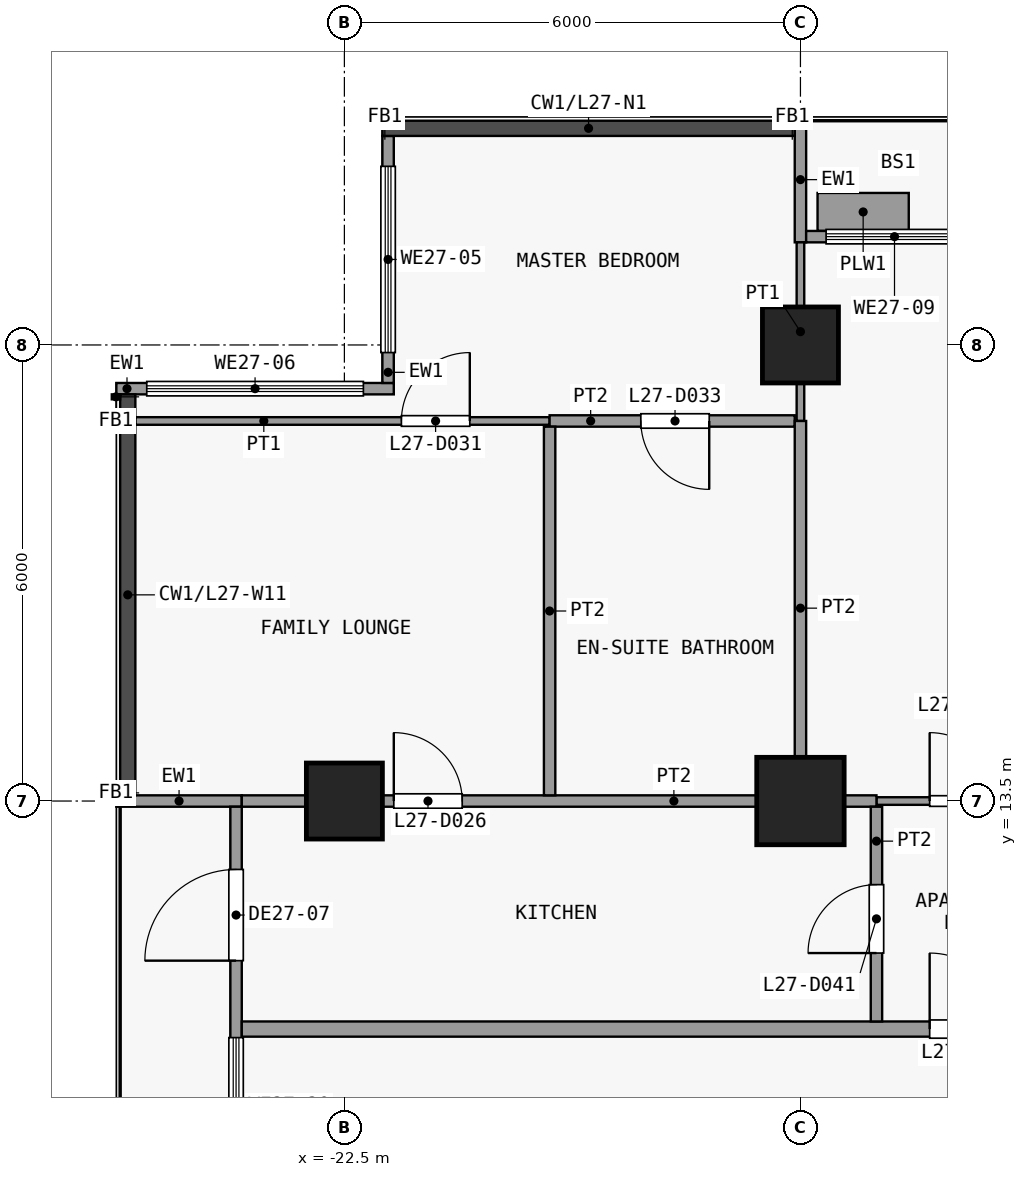
"""IFC4 building model, lengths in metres.
Left out: names, types, materials, properties, quantities, classifications, styles, units other than length and angle.
Written with IfcOpenShell. Run it as: python <this file> out.ifc"""

import sys

from ifc_helpers import new_model, si_unit, direction, frame, frame_2d, origin, origin_2d, place, context, subcontext, project, spatial, rectangle, extrude, element, fill, save


model = new_model("IFC4")
c1 = context("Model", 3, precision=1e-05, world=origin(), true_north=direction((0.0, 1.0)))
c2 = subcontext(c1, "Body", "Model", "MODEL_VIEW")
j1 = project(units=[si_unit("LENGTHUNIT", "METRE"), si_unit("PLANEANGLEUNIT", "RADIAN")], contexts=[c1])
p1 = place(None, origin())
s1 = spatial("IfcSite", under=j1, at=p1, CompositionType="ELEMENT")
p2 = place(p1, origin())
s2 = spatial("IfcBuilding", under=s1, at=p2, CompositionType="ELEMENT")
p3 = place(p2, frame((0.0, 0.0, 109.9)))
s3 = spatial("IfcBuildingStorey", under=s2, at=p3, CompositionType="ELEMENT", Elevation=109.9)
p4 = place(p3, frame((-22.5, 13.5, 0.0), z_axis=(0.0, 0.0, 1.0), x_axis=(1.0, 0.0, 0.0)))
e1 = element("IfcColumn", 1, at=p4, inside=s3, PredefinedType="COLUMN", context=c2, shape_type="SweptSolid", body=[
    extrude(rectangle(XDim=1.0, YDim=1.0, at=origin_2d()), origin(), (0.0, 0.0, 1.0), 3.6),
])
p5 = place(p3, frame((-16.5, 13.5, 0.0), z_axis=(0.0, 0.0, 1.0), x_axis=(1.0, 0.0, 0.0)))
e2 = element("IfcColumn", 2, at=p5, inside=s3, PredefinedType="COLUMN", context=c2, shape_type="SweptSolid", body=[
    extrude(rectangle(XDim=1.15, YDim=1.15, at=origin_2d()), origin(), (0.0, 0.0, 1.0), 3.6),
])
p6 = place(p3, frame((-16.5, 19.5, 0.0), z_axis=(0.0, 0.0, 1.0), x_axis=(1.0, 0.0, 0.0)))
e3 = element("IfcColumn", 3, at=p6, inside=s3, PredefinedType="COLUMN", context=c2, shape_type="SweptSolid", body=[
    extrude(rectangle(XDim=1.0, YDim=1.0, at=origin_2d()), origin(), (0.0, 0.0, 1.0), 3.6),
])
p7 = place(p3, frame((-21.925, 19.0, 0.0), z_axis=(0.0, 0.0, 1.0), x_axis=(0.0, 1.0, 0.0)))
e4 = element("IfcWall", 4, at=p7, inside=s3, PredefinedType="SOLIDWALL", context=c2, shape_type="SweptSolid", body=[
    extrude(rectangle(XDim=3.25, YDim=0.15, at=frame_2d((1.625, 0.0))), origin(), (0.0, 0.0, 1.0), 3.3),
])
p8 = place(p7, frame((0.4, 0.0, 0.9)))
e5 = element("IfcOpeningElement", 5, at=p8, cuts=e4, PredefinedType="OPENING", context=c2, shape_type="SweptSolid", body=[
    extrude(rectangle(XDim=2.45, YDim=2.4, at=frame_2d((1.225, 1.2))), frame((0.0, 0.085, 0.0), z_axis=(0.0, -1.0, 0.0), x_axis=(1.0, 0.0, 0.0)), (0.0, 0.0, 1.0), 0.17),
])
p9 = place(p3, frame((-25.5, 18.925, 0.0), z_axis=(0.0, 0.0, 1.0), x_axis=(1.0, 0.0, 0.0)))
e6 = element("IfcWall", 6, at=p9, inside=s3, PredefinedType="SOLIDWALL", context=c2, shape_type="SweptSolid", body=[
    extrude(rectangle(XDim=3.65, YDim=0.15, at=frame_2d((1.825, 0.0))), origin(), (0.0, 0.0, 1.0), 3.3),
])
p10 = place(p9, frame((0.4, 0.0, 0.9)))
e7 = element("IfcOpeningElement", 7, at=p10, cuts=e6, PredefinedType="OPENING", context=c2, shape_type="SweptSolid", body=[
    extrude(rectangle(XDim=2.85, YDim=2.4, at=frame_2d((1.425, 1.2))), frame((0.0, 0.085, 0.0), z_axis=(0.0, -1.0, 0.0), x_axis=(1.0, 0.0, 0.0)), (0.0, 0.0, 1.0), 0.17),
])
p11 = place(p3, frame((-16.5, 20.85, 0.0), z_axis=(0.0, 0.0, 1.0), x_axis=(0.0, 1.0, 0.0)))
e8 = element("IfcWall", 8, at=p11, inside=s3, PredefinedType="SOLIDWALL", context=c2, shape_type="SweptSolid", body=[
    extrude(rectangle(XDim=1.65, YDim=0.15, at=frame_2d((0.825, 0.0))), origin(), (0.0, 0.0, 1.0), 3.3),
])
p12 = place(p3, frame((-16.425, 20.925, 0.0), z_axis=(0.0, 0.0, 1.0), x_axis=(1.0, 0.0, 0.0)))
e9 = element("IfcWall", 9, at=p12, inside=s3, PredefinedType="SOLIDWALL", context=c2, shape_type="SweptSolid", body=[
    extrude(rectangle(XDim=5.925, YDim=0.15, at=frame_2d((2.962, 0.0))), origin(), (0.0, 0.0, 1.0), 3.3),
])
p13 = place(p12, frame((2.325, 0.0, 0.0)))
e10 = element("IfcOpeningElement", 10, at=p13, cuts=e9, PredefinedType="OPENING", context=c2, shape_type="SweptSolid", body=[
    extrude(rectangle(XDim=1.2, YDim=2.4, at=frame_2d((0.6, 1.2))), frame((0.0, 0.085, 0.0), z_axis=(0.0, -1.0, 0.0), x_axis=(1.0, 0.0, 0.0)), (0.0, 0.0, 1.0), 0.17),
])
p14 = place(p12, frame((0.262, 0.0, 0.9)))
e11 = element("IfcOpeningElement", 11, at=p14, cuts=e9, PredefinedType="OPENING", context=c2, shape_type="SweptSolid", body=[
    extrude(rectangle(XDim=1.8, YDim=2.1, at=frame_2d((0.9, 1.05))), frame((0.0, 0.085, 0.0), z_axis=(0.0, -1.0, 0.0), x_axis=(1.0, 0.0, 0.0)), (0.0, 0.0, 1.0), 0.17),
])
p15 = place(p12, frame((3.825, 0.0, 0.9)))
e12 = element("IfcOpeningElement", 12, at=p15, cuts=e9, PredefinedType="OPENING", context=c2, shape_type="SweptSolid", body=[
    extrude(rectangle(XDim=1.8, YDim=2.1, at=frame_2d((0.9, 1.05))), frame((0.0, 0.085, 0.0), z_axis=(0.0, -1.0, 0.0), x_axis=(1.0, 0.0, 0.0)), (0.0, 0.0, 1.0), 0.17),
])
p16 = place(p3, frame((-16.275, 21.25, 0.0), z_axis=(0.0, 0.0, 1.0), x_axis=(1.0, 0.0, 0.0)))
e13 = element("IfcWall", 13, at=p16, inside=s3, PredefinedType="USERDEFINED", context=c2, shape_type="SweptSolid", body=[
    extrude(rectangle(XDim=1.2, YDim=0.5, at=frame_2d((0.6, 0.0))), origin(), (0.0, 0.0, 1.0), 0.9),
])
p17 = place(p3, frame((-23.85, 13.5, 0.0), z_axis=(0.0, 0.0, 1.0), x_axis=(-1.0, 0.0, 0.0)))
e14 = element("IfcWall", 14, at=p17, inside=s3, PredefinedType="SOLIDWALL", context=c2, shape_type="SweptSolid", body=[
    extrude(rectangle(XDim=1.65, YDim=0.15, at=frame_2d((0.825, 0.0))), origin(), (0.0, 0.0, 1.0), 3.3),
])
p18 = place(p3, frame((-23.925, 7.575, 0.0), z_axis=(0.0, 0.0, 1.0), x_axis=(0.0, 1.0, 0.0)))
e15 = element("IfcWall", 15, at=p18, inside=s3, PredefinedType="SOLIDWALL", context=c2, shape_type="SweptSolid", body=[
    extrude(rectangle(XDim=5.85, YDim=0.15, at=frame_2d((2.925, 0.0))), origin(), (0.0, 0.0, 1.0), 3.3),
])
p19 = place(p18, frame((3.825, 0.0, 0.0)))
e16 = element("IfcOpeningElement", 16, at=p19, cuts=e15, PredefinedType="OPENING", context=c2, shape_type="SweptSolid", body=[
    extrude(rectangle(XDim=1.2, YDim=2.4, at=frame_2d((0.6, 1.2))), frame((0.0, 0.085, 0.0), z_axis=(0.0, -1.0, 0.0), x_axis=(1.0, 0.0, 0.0)), (0.0, 0.0, 1.0), 0.17),
])
p20 = place(p18, frame((1.012, 0.0, 0.9)))
e17 = element("IfcOpeningElement", 17, at=p20, cuts=e15, PredefinedType="OPENING", context=c2, shape_type="SweptSolid", body=[
    extrude(rectangle(XDim=1.8, YDim=2.1, at=frame_2d((0.9, 1.05))), frame((0.0, 0.085, 0.0), z_axis=(0.0, -1.0, 0.0), x_axis=(1.0, 0.0, 0.0)), (0.0, 0.0, 1.0), 0.17),
])
p21 = place(p3, frame((-23.85, 10.5, 0.0), z_axis=(0.0, 0.0, 1.0), x_axis=(1.0, 0.0, 0.0)))
e18 = element("IfcWall", 18, at=p21, inside=s3, PredefinedType="PARTITIONING", context=c2, shape_type="SweptSolid", body=[
    extrude(rectangle(XDim=47.7, YDim=0.2, at=frame_2d((23.85, 0.0))), origin(), (0.0, 0.0, 1.0), 3.3),
])
p22 = place(p21, frame((9.05, 0.0, 0.0)))
e19 = element("IfcOpeningElement", 19, at=p22, cuts=e18, PredefinedType="OPENING", context=c2, shape_type="SweptSolid", body=[
    extrude(rectangle(XDim=1.0, YDim=2.1, at=frame_2d((0.5, 1.05))), frame((0.0, 0.11, 0.0), z_axis=(0.0, -1.0, 0.0), x_axis=(1.0, 0.0, 0.0)), (0.0, 0.0, 1.0), 0.22),
])
p23 = place(p21, frame((14.05, 0.0, 0.0)))
e20 = element("IfcOpeningElement", 20, at=p23, cuts=e18, PredefinedType="OPENING", context=c2, shape_type="SweptSolid", body=[
    extrude(rectangle(XDim=1.0, YDim=2.1, at=frame_2d((0.5, 1.05))), frame((0.0, 0.11, 0.0), z_axis=(0.0, -1.0, 0.0), x_axis=(1.0, 0.0, 0.0)), (0.0, 0.0, 1.0), 0.22),
])
p24 = place(p21, frame((29.05, 0.0, 0.0)))
e21 = element("IfcOpeningElement", 21, at=p24, cuts=e18, PredefinedType="OPENING", context=c2, shape_type="SweptSolid", body=[
    extrude(rectangle(XDim=1.0, YDim=2.1, at=frame_2d((0.5, 1.05))), frame((0.0, 0.11, 0.0), z_axis=(0.0, -1.0, 0.0), x_axis=(1.0, 0.0, 0.0)), (0.0, 0.0, 1.0), 0.22),
])
p25 = place(p21, frame((41.05, 0.0, 0.0)))
e22 = element("IfcOpeningElement", 22, at=p25, cuts=e18, PredefinedType="OPENING", context=c2, shape_type="SweptSolid", body=[
    extrude(rectangle(XDim=1.0, YDim=2.1, at=frame_2d((0.5, 1.05))), frame((0.0, 0.11, 0.0), z_axis=(0.0, -1.0, 0.0), x_axis=(1.0, 0.0, 0.0)), (0.0, 0.0, 1.0), 0.22),
])
p26 = place(p3, frame((-15.5, 13.5, 0.0), z_axis=(0.0, 0.0, 1.0), x_axis=(1.0, 0.0, 0.0)))
e23 = element("IfcWall", 23, at=p26, inside=s3, PredefinedType="PARTITIONING", context=c2, shape_type="SweptSolid", body=[
    extrude(rectangle(XDim=2.4, YDim=0.1, at=frame_2d((1.2, 0.0))), origin(), (0.0, 0.0, 1.0), 3.3),
])
p27 = place(p26, frame((0.7, 0.0, 0.0)))
e24 = element("IfcOpeningElement", 24, at=p27, cuts=e23, PredefinedType="OPENING", context=c2, shape_type="SweptSolid", body=[
    extrude(rectangle(XDim=0.9, YDim=2.1, at=frame_2d((0.45, 1.05))), frame((0.0, 0.06, 0.0), z_axis=(0.0, -1.0, 0.0), x_axis=(1.0, 0.0, 0.0)), (0.0, 0.0, 1.0), 0.12),
])
p28 = place(p3, frame((-23.85, 13.5, 0.0), z_axis=(0.0, 0.0, 1.0), x_axis=(1.0, 0.0, 0.0)))
e25 = element("IfcWall", 25, at=p28, inside=s3, PredefinedType="PARTITIONING", context=c2, shape_type="SweptSolid", body=[
    extrude(rectangle(XDim=8.35, YDim=0.15, at=frame_2d((4.175, 0.0))), origin(), (0.0, 0.0, 1.0), 3.3),
])
p29 = place(p28, frame((2.0, 0.0, 0.0)))
e26 = element("IfcOpeningElement", 26, at=p29, cuts=e25, PredefinedType="OPENING", context=c2, shape_type="SweptSolid", body=[
    extrude(rectangle(XDim=0.9, YDim=2.1, at=frame_2d((0.45, 1.05))), frame((0.0, 0.085, 0.0), z_axis=(0.0, -1.0, 0.0), x_axis=(1.0, 0.0, 0.0)), (0.0, 0.0, 1.0), 0.17),
])
p30 = place(p3, frame((-25.25, 18.5, 0.0), z_axis=(0.0, 0.0, 1.0), x_axis=(1.0, 0.0, 0.0)))
e27 = element("IfcWall", 27, at=p30, inside=s3, PredefinedType="PARTITIONING", context=c2, shape_type="SweptSolid", body=[
    extrude(rectangle(XDim=5.45, YDim=0.1, at=frame_2d((2.725, 0.0))), origin(), (0.0, 0.0, 1.0), 3.3),
])
p31 = place(p30, frame((3.5, 0.0, 0.0)))
e28 = element("IfcOpeningElement", 28, at=p31, cuts=e27, PredefinedType="OPENING", context=c2, shape_type="SweptSolid", body=[
    extrude(rectangle(XDim=0.9, YDim=2.1, at=frame_2d((0.45, 1.05))), frame((0.0, 0.06, 0.0), z_axis=(0.0, -1.0, 0.0), x_axis=(1.0, 0.0, 0.0)), (0.0, 0.0, 1.0), 0.12),
])
p32 = place(p3, frame((-19.8, 18.5, 0.0), z_axis=(0.0, 0.0, 1.0), x_axis=(1.0, 0.0, 0.0)))
e29 = element("IfcWall", 29, at=p32, inside=s3, PredefinedType="PARTITIONING", context=c2, shape_type="SweptSolid", body=[
    extrude(rectangle(XDim=3.225, YDim=0.15, at=frame_2d((1.613, 0.0))), origin(), (0.0, 0.0, 1.0), 3.3),
])
p33 = place(p32, frame((1.2, 0.0, 0.0)))
e30 = element("IfcOpeningElement", 30, at=p33, cuts=e29, PredefinedType="OPENING", context=c2, shape_type="SweptSolid", body=[
    extrude(rectangle(XDim=0.9, YDim=2.1, at=frame_2d((0.45, 1.05))), frame((0.0, 0.085, 0.0), z_axis=(0.0, -1.0, 0.0), x_axis=(1.0, 0.0, 0.0)), (0.0, 0.0, 1.0), 0.17),
])
p34 = place(p3, frame((-19.8, 13.575, 0.0), z_axis=(0.0, 0.0, 1.0), x_axis=(0.0, 1.0, 0.0)))
e31 = element("IfcWall", 31, at=p34, inside=s3, PredefinedType="PARTITIONING", context=c2, shape_type="SweptSolid", body=[
    extrude(rectangle(XDim=4.85, YDim=0.15, at=frame_2d((2.425, 0.0))), origin(), (0.0, 0.0, 1.0), 3.3),
])
p35 = place(p3, frame((-16.5, 18.5, 0.0), z_axis=(0.0, 0.0, 1.0), x_axis=(0.0, 1.0, 0.0)))
e32 = element("IfcWall", 32, at=p35, inside=s3, PredefinedType="PARTITIONING", context=c2, shape_type="SweptSolid", body=[
    extrude(rectangle(XDim=2.35, YDim=0.1, at=frame_2d((1.175, 0.0))), origin(), (0.0, 0.0, 1.0), 3.3),
])
p36 = place(p3, frame((-16.5, 13.575, 0.0), z_axis=(0.0, 0.0, 1.0), x_axis=(0.0, 1.0, 0.0)))
e33 = element("IfcWall", 33, at=p36, inside=s3, PredefinedType="PARTITIONING", context=c2, shape_type="SweptSolid", body=[
    extrude(rectangle(XDim=4.925, YDim=0.15, at=frame_2d((2.462, 0.0))), origin(), (0.0, 0.0, 1.0), 3.3),
])
p37 = place(p3, frame((-15.5, 10.6, 0.0), z_axis=(0.0, 0.0, 1.0), x_axis=(0.0, 1.0, 0.0)))
e34 = element("IfcWall", 34, at=p37, inside=s3, PredefinedType="PARTITIONING", context=c2, shape_type="SweptSolid", body=[
    extrude(rectangle(XDim=2.825, YDim=0.15, at=frame_2d((1.413, 0.0))), origin(), (0.0, 0.0, 1.0), 3.3),
])
p38 = place(p37, frame((0.9, 0.0, 0.0)))
e35 = element("IfcOpeningElement", 35, at=p38, cuts=e34, PredefinedType="OPENING", context=c2, shape_type="SweptSolid", body=[
    extrude(rectangle(XDim=0.9, YDim=2.1, at=frame_2d((0.45, 1.05))), frame((0.0, 0.085, 0.0), z_axis=(0.0, -1.0, 0.0), x_axis=(1.0, 0.0, 0.0)), (0.0, 0.0, 1.0), 0.17),
])
p39 = place(p8, origin())
e36 = element("IfcWindow", 36, at=p39, inside=s3, PartitioningType="SINGLE_PANEL", PredefinedType="WINDOW", context=c2, shape_type="SweptSolid", body=[
    extrude(rectangle(XDim=2.45, YDim=2.4, at=frame_2d((1.225, 1.2))), frame((0.0, 0.03, 0.0), z_axis=(0.0, -1.0, 0.0), x_axis=(1.0, 0.0, 0.0)), (0.0, 0.0, 1.0), 0.06),
])
fill(e5, e36)
p40 = place(p10, origin())
e37 = element("IfcWindow", 37, at=p40, inside=s3, PartitioningType="SINGLE_PANEL", PredefinedType="WINDOW", context=c2, shape_type="SweptSolid", body=[
    extrude(rectangle(XDim=2.85, YDim=2.4, at=frame_2d((1.425, 1.2))), frame((0.0, 0.03, 0.0), z_axis=(0.0, -1.0, 0.0), x_axis=(1.0, 0.0, 0.0)), (0.0, 0.0, 1.0), 0.06),
])
fill(e7, e37)
p41 = place(p14, origin())
e38 = element("IfcWindow", 38, at=p41, inside=s3, PartitioningType="SINGLE_PANEL", PredefinedType="WINDOW", context=c2, shape_type="SweptSolid", body=[
    extrude(rectangle(XDim=1.8, YDim=2.1, at=frame_2d((0.9, 1.05))), frame((0.0, 0.03, 0.0), z_axis=(0.0, -1.0, 0.0), x_axis=(1.0, 0.0, 0.0)), (0.0, 0.0, 1.0), 0.06),
])
fill(e11, e38)
p42 = place(p19, origin())
e39 = element("IfcDoor", 39, at=p42, inside=s3, OperationType="SINGLE_SWING_LEFT", PredefinedType="DOOR", context=c2, shape_type="SweptSolid", body=[
    extrude(rectangle(XDim=1.2, YDim=2.4, at=frame_2d((0.6, 1.2))), frame((0.0, 0.025, 0.0), z_axis=(0.0, -1.0, 0.0), x_axis=(1.0, 0.0, 0.0)), (0.0, 0.0, 1.0), 0.05),
])
fill(e16, e39)
p43 = place(p20, origin())
e40 = element("IfcWindow", 40, at=p43, inside=s3, PartitioningType="SINGLE_PANEL", PredefinedType="WINDOW", context=c2, shape_type="SweptSolid", body=[
    extrude(rectangle(XDim=1.8, YDim=2.1, at=frame_2d((0.9, 1.05))), frame((0.0, 0.03, 0.0), z_axis=(0.0, -1.0, 0.0), x_axis=(1.0, 0.0, 0.0)), (0.0, 0.0, 1.0), 0.06),
])
fill(e17, e40)
p44 = place(p22, origin())
e41 = element("IfcDoor", 41, at=p44, inside=s3, OperationType="SINGLE_SWING_RIGHT", PredefinedType="DOOR", context=c2, shape_type="SweptSolid", body=[
    extrude(rectangle(XDim=1.0, YDim=2.1, at=frame_2d((0.5, 1.05))), frame((0.0, 0.025, 0.0), z_axis=(0.0, -1.0, 0.0), x_axis=(1.0, 0.0, 0.0)), (0.0, 0.0, 1.0), 0.05),
])
fill(e19, e41)
p45 = place(p27, origin())
e42 = element("IfcDoor", 42, at=p45, inside=s3, OperationType="SINGLE_SWING_RIGHT", PredefinedType="DOOR", context=c2, shape_type="SweptSolid", body=[
    extrude(rectangle(XDim=0.9, YDim=2.1, at=frame_2d((0.45, 1.05))), frame((0.0, 0.025, 0.0), z_axis=(0.0, -1.0, 0.0), x_axis=(1.0, 0.0, 0.0)), (0.0, 0.0, 1.0), 0.05),
])
fill(e24, e42)
p46 = place(p29, origin())
e43 = element("IfcDoor", 43, at=p46, inside=s3, OperationType="SINGLE_SWING_RIGHT", PredefinedType="DOOR", context=c2, shape_type="SweptSolid", body=[
    extrude(rectangle(XDim=0.9, YDim=2.1, at=frame_2d((0.45, 1.05))), frame((0.0, 0.025, 0.0), z_axis=(0.0, -1.0, 0.0), x_axis=(1.0, 0.0, 0.0)), (0.0, 0.0, 1.0), 0.05),
])
fill(e26, e43)
p47 = place(p31, origin())
e44 = element("IfcDoor", 44, at=p47, inside=s3, OperationType="SINGLE_SWING_LEFT", PredefinedType="DOOR", context=c2, shape_type="SweptSolid", body=[
    extrude(rectangle(XDim=0.9, YDim=2.1, at=frame_2d((0.45, 1.05))), frame((0.0, 0.025, 0.0), z_axis=(0.0, -1.0, 0.0), x_axis=(1.0, 0.0, 0.0)), (0.0, 0.0, 1.0), 0.05),
])
fill(e28, e44)
p48 = place(p33, origin())
e45 = element("IfcDoor", 45, at=p48, inside=s3, OperationType="SINGLE_SWING_RIGHT", PredefinedType="DOOR", context=c2, shape_type="SweptSolid", body=[
    extrude(rectangle(XDim=0.9, YDim=2.1, at=frame_2d((0.45, 1.05))), frame((0.0, 0.025, 0.0), z_axis=(0.0, -1.0, 0.0), x_axis=(1.0, 0.0, 0.0)), (0.0, 0.0, 1.0), 0.05),
])
fill(e30, e45)
p49 = place(p38, origin())
e46 = element("IfcDoor", 46, at=p49, inside=s3, OperationType="SINGLE_SWING_RIGHT", PredefinedType="DOOR", context=c2, shape_type="SweptSolid", body=[
    extrude(rectangle(XDim=0.9, YDim=2.1, at=frame_2d((0.45, 1.05))), frame((0.0, 0.025, 0.0), z_axis=(0.0, -1.0, 0.0), x_axis=(1.0, 0.0, 0.0)), (0.0, 0.0, 1.0), 0.05),
])
fill(e35, e46)
save(model, sys.argv[1])
